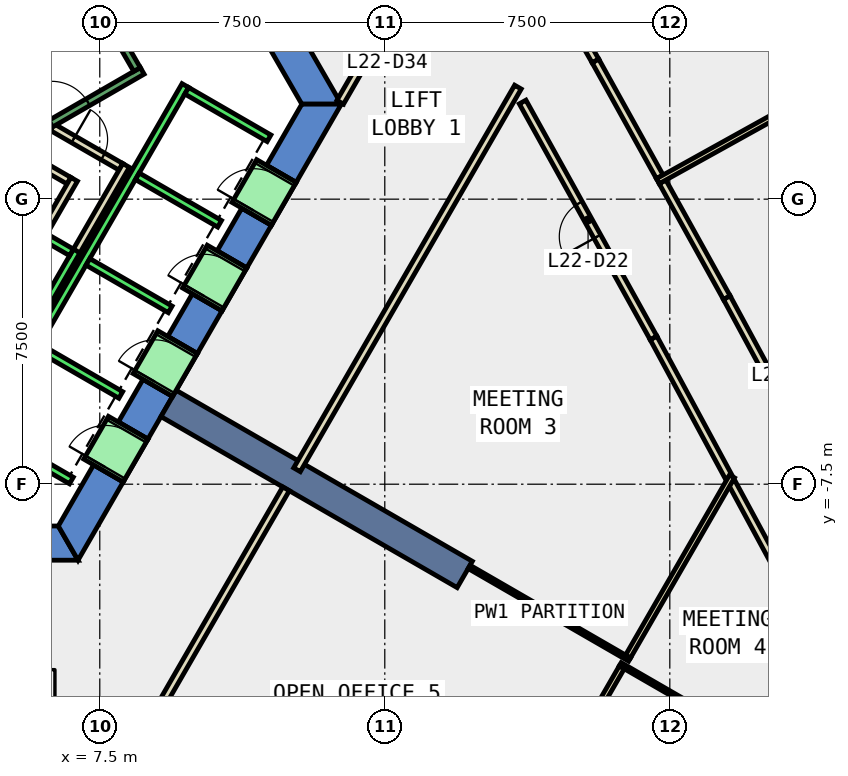
"""IFC4 building model, lengths in metres.
Left out: names, types, materials, properties, quantities, classifications, styles, units other than length and angle.
Written with IfcOpenShell. Run it as: python <this file> out.ifc"""

import sys

from ifc_helpers import new_model, si_unit, direction, frame, frame_2d, origin, place, context, subcontext, project, spatial, polyline, rectangle, outline, extrude, element, fill, save


model = new_model("IFC4")
c1 = context("Model", 3, precision=1e-05, world=origin(), true_north=direction((0.0, 1.0)))
c2 = subcontext(c1, "Body", "Model", "MODEL_VIEW")
j1 = project(units=[si_unit("LENGTHUNIT", "METRE"), si_unit("PLANEANGLEUNIT", "RADIAN")], contexts=[c1])
p1 = place(None, origin())
s1 = spatial("IfcSite", under=j1, at=p1, CompositionType="ELEMENT")
p2 = place(p1, origin())
s2 = spatial("IfcBuilding", under=s1, at=p2, CompositionType="ELEMENT")
p3 = place(p2, frame((0.0, 0.0, 103.4)))
s3 = spatial("IfcBuildingStorey", under=s2, at=p3, CompositionType="ELEMENT", Elevation=103.4)
p4 = place(p3, frame((0.0, 0.0, -0.4)))
e1 = element("IfcWall", 1, at=p4, inside=s3, PredefinedType="SHEAR", context=c2, shape_type="SweptSolid", body=[
    extrude(outline(polyline([(8.517, 11.748), (7.738, 11.298), (12.817, 2.5), (13.856, 2.5), (8.517, 11.748)])), origin(), (0.0, 0.0, 1.0), 4.2),
])
p5 = place(p3, frame((0.0, 0.0, -0.4)))
e2 = element("IfcWall", 2, at=p5, inside=s3, PredefinedType="SHEAR", context=c2, shape_type="SweptSolid", body=[
    extrude(outline(polyline([(5.75, -8.6), (5.75, -9.5), (6.928, -9.5), (6.409, -8.6), (5.75, -8.6)])), origin(), (0.0, 0.0, 1.0), 4.2),
])
p6 = place(p3, frame((0.0, 0.0, -0.4)))
e3 = element("IfcWall", 3, at=p6, inside=s3, PredefinedType="SHEAR", context=c2, shape_type="SweptSolid", body=[
    extrude(outline(polyline([(8.117, -7.44), (7.338, -6.99), (6.409, -8.6), (6.928, -9.5), (8.117, -7.44)])), origin(), (0.0, 0.0, 1.0), 4.2),
])
p7 = place(p3, frame((0.0, 0.0, -0.4)))
e4 = element("IfcWall", 4, at=p7, inside=s3, PredefinedType="SHEAR", context=c2, shape_type="SweptSolid", body=[
    extrude(outline(polyline([(9.417, -5.189), (8.638, -4.739), (7.988, -5.864), (8.767, -6.314), (9.417, -5.189)])), origin(), (0.0, 0.0, 1.0), 4.2),
])
p8 = place(p3, frame((0.0, 0.0, -0.4)))
e5 = element("IfcWall", 5, at=p8, inside=s3, PredefinedType="SHEAR", context=c2, shape_type="SweptSolid", body=[
    extrude(outline(polyline([(10.717, -2.937), (9.938, -2.487), (9.288, -3.613), (10.067, -4.063), (10.717, -2.937)])), origin(), (0.0, 0.0, 1.0), 4.2),
])
p9 = place(p3, frame((0.0, 0.0, -0.4)))
e6 = element("IfcWall", 6, at=p9, inside=s3, PredefinedType="SHEAR", context=c2, shape_type="SweptSolid", body=[
    extrude(outline(polyline([(12.017, -0.686), (11.238, -0.236), (10.588, -1.361), (11.367, -1.811), (12.017, -0.686)])), origin(), (0.0, 0.0, 1.0), 4.2),
])
p10 = place(p3, frame((0.0, 0.0, -0.4)))
e7 = element("IfcWall", 7, at=p10, inside=s3, PredefinedType="SHEAR", context=c2, shape_type="SweptSolid", body=[
    extrude(outline(polyline([(11.888, 0.89), (12.667, 0.44), (13.856, 2.5), (12.817, 2.5), (11.888, 0.89)])), origin(), (0.0, 0.0, 1.0), 4.2),
])
p11 = place(p3, frame((0.0, 0.0, 3.6)))
e8 = element("IfcWall", 8, at=p11, inside=s3, PredefinedType="SHEAR", context=c2, shape_type="SweptSolid", body=[
    extrude(outline(polyline([(8.767, -6.314), (7.988, -5.864), (7.338, -6.99), (8.117, -7.44), (8.767, -6.314)])), origin(), (0.0, 0.0, 1.0), 0.2),
])
p12 = place(p3, frame((0.0, 0.0, 3.6)))
e9 = element("IfcWall", 9, at=p12, inside=s3, PredefinedType="SHEAR", context=c2, shape_type="SweptSolid", body=[
    extrude(outline(polyline([(10.067, -4.063), (9.288, -3.613), (8.638, -4.739), (9.417, -5.189), (10.067, -4.063)])), origin(), (0.0, 0.0, 1.0), 0.2),
])
p13 = place(p3, frame((0.0, 0.0, 3.6)))
e10 = element("IfcWall", 10, at=p13, inside=s3, PredefinedType="SHEAR", context=c2, shape_type="SweptSolid", body=[
    extrude(outline(polyline([(11.367, -1.811), (10.588, -1.361), (9.938, -2.487), (10.717, -2.937), (11.367, -1.811)])), origin(), (0.0, 0.0, 1.0), 0.2),
])
p14 = place(p3, frame((0.0, 0.0, 3.6)))
e11 = element("IfcWall", 11, at=p14, inside=s3, PredefinedType="SHEAR", context=c2, shape_type="SweptSolid", body=[
    extrude(outline(polyline([(12.667, 0.44), (11.888, 0.89), (11.238, -0.236), (12.017, -0.686), (12.667, 0.44)])), origin(), (0.0, 0.0, 1.0), 0.2),
])
p15 = place(p3, frame((9.31, -5.375, -0.4), z_axis=(0.0, 0.0, 1.0), x_axis=(0.866017533419, -0.500013631625, 0.0)))
e12 = element("IfcWall", 12, at=p15, inside=s3, PredefinedType="SHEAR", context=c2, shape_type="SweptSolid", body=[
    extrude(rectangle(XDim=9.0, YDim=0.8, at=frame_2d((4.5, 0.0))), origin(), (0.0, 0.0, 1.0), 4.2),
])
p16 = place(p3, frame((24.051, -7.315, 0.0), z_axis=(0.0, 0.0, 1.0), x_axis=(-0.475308630647, 0.87981913234, 0.0)))
e13 = element("IfcWall", 13, at=p16, inside=s3, PredefinedType="PARTITIONING", context=c2, shape_type="SweptSolid", body=[
    extrude(rectangle(XDim=4.166, YDim=0.2, at=frame_2d((2.083, 0.0))), origin(), (0.0, 0.0, 1.0), 3.8),
])
p17 = place(p3, frame((22.071, -3.65, 0.0), z_axis=(0.0, 0.0, 1.0), x_axis=(-0.485198988697, 0.874403763354, 0.0)))
e14 = element("IfcWall", 14, at=p17, inside=s3, PredefinedType="PARTITIONING", context=c2, shape_type="SweptSolid", body=[
    extrude(rectangle(XDim=7.098, YDim=0.2, at=frame_2d((3.549, 0.0))), origin(), (0.0, 0.0, 1.0), 3.8),
])
p18 = place(p17, frame((3.049, 0.0, 0.0)))
e15 = element("IfcOpeningElement", 15, at=p18, cuts=e14, PredefinedType="OPENING", context=c2, shape_type="SweptSolid", body=[
    extrude(rectangle(XDim=1.0, YDim=2.1, at=frame_2d((0.5, 1.05))), frame((0.0, 0.11, 0.0), z_axis=(0.0, -1.0, 0.0), x_axis=(1.0, 0.0, 0.0)), (0.0, 0.0, 1.0), 0.22),
])
p19 = place(p3, frame((25.446, -9.896, 0.0), z_axis=(0.0, 0.0, 1.0), x_axis=(-0.475427182652, 0.879755076141, 0.0)))
e16 = element("IfcWall", 16, at=p19, inside=s3, PredefinedType="PARTITIONING", context=c2, shape_type="SweptSolid", body=[
    extrude(rectangle(XDim=2.785, YDim=0.2, at=frame_2d((1.393, 0.0))), origin(), (0.0, 0.0, 1.0), 3.8),
])
p20 = place(p3, frame((22.309, 0.456, 0.0), z_axis=(0.0, 0.0, 1.0), x_axis=(0.484982854201, -0.87452365956, 0.0)))
e17 = element("IfcWall", 17, at=p20, inside=s3, PredefinedType="PARTITIONING", context=c2, shape_type="SweptSolid", body=[
    extrude(rectangle(XDim=3.487, YDim=0.2, at=frame_2d((1.743, 0.0))), origin(), (0.0, 0.0, 1.0), 3.8),
])
p21 = place(p3, frame((24.0, -2.593, 0.0), z_axis=(0.0, 0.0, 1.0), x_axis=(0.475480817472, -0.879726089312, 0.0)))
e18 = element("IfcWall", 18, at=p21, inside=s3, PredefinedType="PARTITIONING", context=c2, shape_type="SweptSolid", body=[
    extrude(rectangle(XDim=7.05, YDim=0.2, at=frame_2d((3.525, 0.0))), origin(), (0.0, 0.0, 1.0), 3.8),
])
p22 = place(p21, frame((3.1, 0.0, 0.0)))
e19 = element("IfcOpeningElement", 19, at=p22, cuts=e18, PredefinedType="OPENING", context=c2, shape_type="SweptSolid", body=[
    extrude(rectangle(XDim=1.0, YDim=2.1, at=frame_2d((0.5, 1.05))), frame((0.0, 0.11, 0.0), z_axis=(0.0, -1.0, 0.0), x_axis=(1.0, 0.0, 0.0)), (0.0, 0.0, 1.0), 0.22),
])
p23 = place(p3, frame((16.98, 9.89, 0.0), z_axis=(0.0, 0.0, 1.0), x_axis=(0.495123170501, -0.868822793228, 0.0)))
e20 = element("IfcWall", 20, at=p23, inside=s3, PredefinedType="PARTITIONING", context=c2, shape_type="SweptSolid", body=[
    extrude(rectangle(XDim=7.198, YDim=0.2, at=frame_2d((3.599, 0.0))), origin(), (0.0, 0.0, 1.0), 3.8),
])
p24 = place(p23, frame((3.099, 0.0, 0.0)))
e21 = element("IfcOpeningElement", 21, at=p24, cuts=e20, PredefinedType="OPENING", context=c2, shape_type="SweptSolid", body=[
    extrude(rectangle(XDim=1.0, YDim=2.1, at=frame_2d((0.5, 1.05))), frame((0.0, 0.11, 0.0), z_axis=(0.0, -1.0, 0.0), x_axis=(1.0, 0.0, 0.0)), (0.0, 0.0, 1.0), 0.22),
])
p25 = place(p3, frame((20.544, 3.636, 0.0), z_axis=(0.0, 0.0, 1.0), x_axis=(0.485250552989, -0.874375148792, 0.0)))
e22 = element("IfcWall", 22, at=p25, inside=s3, PredefinedType="PARTITIONING", context=c2, shape_type="SweptSolid", body=[
    extrude(rectangle(XDim=3.487, YDim=0.2, at=frame_2d((1.744, 0.0))), origin(), (0.0, 0.0, 1.0), 3.8),
])
p26 = place(p3, frame((5.499, 1.172, 0.0), z_axis=(0.0, 0.0, 1.0), x_axis=(0.866333505267, -0.499465972466, 0.0)))
e23 = element("IfcWall", 23, at=p26, inside=s3, PredefinedType="PARTITIONING", context=c2, shape_type="SweptSolid", body=[
    extrude(rectangle(XDim=1.374, YDim=0.2, at=frame_2d((0.687, 0.0))), origin(), (0.0, 0.0, 1.0), 3.8),
])
p27 = place(p3, frame((6.826, 0.522, 0.0), z_axis=(0.0, 0.0, 1.0), x_axis=(-0.500016722714, -0.866015748706, 0.0)))
e24 = element("IfcWall", 24, at=p27, inside=s3, PredefinedType="PARTITIONING", context=c2, shape_type="SweptSolid", body=[
    extrude(rectangle(XDim=1.7, YDim=0.2, at=frame_2d((0.85, 0.0))), origin(), (0.0, 0.0, 1.0), 3.8),
])
p28 = place(p3, frame((6.25, 1.894, 0.0), z_axis=(0.0, 0.0, 1.0), x_axis=(0.866043184279, -0.499969202016, 0.0)))
e25 = element("IfcWall", 25, at=p28, inside=s3, PredefinedType="PARTITIONING", context=c2, shape_type="SweptSolid", body=[
    extrude(rectangle(XDim=2.084, YDim=0.2, at=frame_2d((1.042, 0.0))), origin(), (0.0, 0.0, 1.0), 3.8),
])
p29 = place(p28, frame((0.642, 0.0, 0.0)))
e26 = element("IfcOpeningElement", 26, at=p29, cuts=e25, PredefinedType="OPENING", context=c2, shape_type="SweptSolid", body=[
    extrude(rectangle(XDim=0.9, YDim=2.1, at=frame_2d((0.45, 1.05))), frame((0.0, 0.11, 0.0), z_axis=(0.0, -1.0, 0.0), x_axis=(1.0, 0.0, 0.0)), (0.0, 0.0, 1.0), 0.22),
])
p30 = place(p3, frame((8.192, 0.888, 0.0), z_axis=(0.0, 0.0, 1.0), x_axis=(-0.499940625693, -0.866059680843, 0.0)))
e27 = element("IfcWall", 27, at=p30, inside=s3, PredefinedType="PARTITIONING", context=c2, shape_type="SweptSolid", body=[
    extrude(rectangle(XDim=2.68, YDim=0.2, at=frame_2d((1.34, 0.0))), origin(), (0.0, 0.0, 1.0), 3.8),
])
p31 = place(p3, frame((13.827, 2.55, 0.0), z_axis=(0.0, 0.0, 1.0), x_axis=(0.500070719615, 0.865984569946, 0.0)))
e28 = element("IfcWall", 28, at=p31, inside=s3, PredefinedType="PARTITIONING", context=c2, shape_type="SweptSolid", body=[
    extrude(rectangle(XDim=4.935, YDim=0.2, at=frame_2d((2.468, 0.0))), origin(), (0.0, 0.0, 1.0), 3.8),
])
p32 = place(p31, frame((1.968, 0.0, 0.0)))
e29 = element("IfcOpeningElement", 29, at=p32, cuts=e28, PredefinedType="OPENING", context=c2, shape_type="SweptSolid", body=[
    extrude(rectangle(XDim=1.0, YDim=2.1, at=frame_2d((0.5, 1.05))), frame((0.0, 0.11, 0.0), z_axis=(0.0, -1.0, 0.0), x_axis=(1.0, 0.0, 0.0)), (0.0, 0.0, 1.0), 0.22),
])
p33 = place(p31, frame((3.068, 0.0, 0.0)))
e30 = element("IfcOpeningElement", 30, at=p33, cuts=e28, PredefinedType="OPENING", context=c2, shape_type="SweptSolid", body=[
    extrude(rectangle(XDim=1.0, YDim=2.1, at=frame_2d((0.5, 1.05))), frame((0.0, 0.11, 0.0), z_axis=(0.0, -1.0, 0.0), x_axis=(1.0, 0.0, 0.0)), (0.0, 0.0, 1.0), 0.22),
])
p34 = place(p3, frame((12.401, -7.621, 0.0), z_axis=(0.0, 0.0, 1.0), x_axis=(-0.499983724212, -0.866034800411, 0.0)))
e31 = element("IfcWall", 31, at=p34, inside=s3, PredefinedType="PARTITIONING", context=c2, shape_type="SweptSolid", body=[
    extrude(rectangle(XDim=9.302, YDim=0.2, at=frame_2d((4.651, 0.0))), origin(), (0.0, 0.0, 1.0), 3.8),
])
p35 = place(p3, frame((18.503, 2.949, 0.0), z_axis=(0.0, 0.0, 1.0), x_axis=(-0.49997390151, -0.86604047123, 0.0)))
e32 = element("IfcWall", 32, at=p35, inside=s3, PredefinedType="PARTITIONING", context=c2, shape_type="SweptSolid", body=[
    extrude(rectangle(XDim=11.626, YDim=0.2, at=frame_2d((5.813, 0.0))), origin(), (0.0, 0.0, 1.0), 3.8),
])
p36 = place(p3, frame((17.219, -9.676, 0.0), z_axis=(0.0, 0.0, 1.0), x_axis=(0.86598459596, -0.500070674565, 0.0)))
e33 = element("IfcWall", 33, at=p36, inside=s3, PredefinedType="PARTITIONING", context=c2, shape_type="SweptSolid", body=[
    extrude(rectangle(XDim=4.875, YDim=0.1, at=frame_2d((2.438, 0.0))), origin(), (0.0, 0.0, 1.0), 3.8),
])
p37 = place(p3, frame((21.236, -12.319, 0.0), z_axis=(0.0, 0.0, 1.0), x_axis=(-0.500016488359, -0.866015884017, 0.0)))
e34 = element("IfcWall", 34, at=p37, inside=s3, PredefinedType="PARTITIONING", context=c2, shape_type="SweptSolid", body=[
    extrude(rectangle(XDim=5.702, YDim=0.15, at=frame_2d((2.851, 0.0))), origin(), (0.0, 0.0, 1.0), 3.8),
])
p38 = place(p3, frame((24.137, -7.294, 0.0), z_axis=(0.0, 0.0, 1.0), x_axis=(-0.500001804394, -0.866024362014, 0.0)))
e35 = element("IfcWall", 35, at=p38, inside=s3, PredefinedType="PARTITIONING", context=c2, shape_type="SweptSolid", body=[
    extrude(rectangle(XDim=5.472, YDim=0.15, at=frame_2d((2.736, 0.0))), origin(), (0.0, 0.0, 1.0), 3.8),
])
p39 = place(p3, frame((21.196, -12.238, 0.0), z_axis=(0.0, 0.0, 1.0), x_axis=(0.866023145199, -0.500003911965, 0.0)))
e36 = element("IfcWall", 36, at=p39, inside=s3, PredefinedType="PARTITIONING", context=c2, shape_type="SweptSolid", body=[
    extrude(rectangle(XDim=8.71, YDim=0.1, at=frame_2d((4.355, 0.0))), origin(), (0.0, 0.0, 1.0), 3.8),
])
p40 = place(p3, frame((22.185, 0.473, 0.0), z_axis=(0.0, 0.0, 1.0), x_axis=(0.874372498137, 0.485255329184, 0.0)))
e37 = element("IfcWall", 37, at=p40, inside=s3, PredefinedType="PARTITIONING", context=c2, shape_type="SweptSolid", body=[
    extrude(rectangle(XDim=6.9, YDim=0.15, at=frame_2d((3.45, 0.0))), origin(), (0.0, 0.0, 1.0), 3.8),
])
p41 = place(p3, frame((5.492, -3.788, 0.0), z_axis=(0.0, 0.0, 1.0), x_axis=(0.500011755427, 0.866018616679, 0.0)))
e38 = element("IfcWall", 38, at=p41, inside=s3, PredefinedType="STANDARD", context=c2, shape_type="SweptSolid", body=[
    extrude(rectangle(XDim=2.8, YDim=0.2, at=frame_2d((1.4, 0.0))), origin(), (0.0, 0.0, 1.0), 3.8),
])
p42 = place(p3, frame((4.677, -0.2, 0.0), z_axis=(0.0, 0.0, 1.0), x_axis=(0.865973769406, -0.500089422704, 0.0)))
e39 = element("IfcWall", 39, at=p42, inside=s3, PredefinedType="STANDARD", context=c2, shape_type="SweptSolid", body=[
    extrude(rectangle(XDim=2.399, YDim=0.2, at=frame_2d((1.2, 0.0))), origin(), (0.0, 0.0, 1.0), 3.8),
])
p43 = place(p3, frame((4.451, -6.19, 0.0), z_axis=(0.0, 0.0, 1.0), x_axis=(0.50000090737, 0.866024879913, 0.0)))
e40 = element("IfcWall", 40, at=p43, inside=s3, PredefinedType="STANDARD", context=c2, shape_type="SweptSolid", body=[
    extrude(rectangle(XDim=10.6, YDim=0.2, at=frame_2d((5.3, 0.0))), origin(), (0.0, 0.0, 1.0), 3.8),
])
for number, where, z_axis, x_axis in (
    (41, (4.588, -6.153, 0.0), (0.0, 0.0, 1.0), (0.866, -0.5, 0.0)),
    (42, (5.888, -3.902, 0.0), (0.0, 0.0, 1.0), (0.866, -0.5, 0.0)),
    (43, (7.188, -1.65, 0.0), (0.0, 0.0, 1.0), (0.866, -0.5, 0.0)),
    (44, (8.488, 0.602, 0.0), (0.0, 0.0, 1.0), (0.866, -0.5, 0.0)),
):
    element("IfcWall", number, at=place(p3, frame(where, z_axis=z_axis, x_axis=x_axis)), inside=s3, PredefinedType="STANDARD", context=c2, shape_type="SweptSolid", body=[
        extrude(rectangle(XDim=2.5, YDim=0.2, at=frame_2d((1.25, 0.0))), origin(), (0.0, 0.0, 1.0), 3.8),
    ])
p44 = place(p3, frame((9.788, 2.853, 0.0), z_axis=(0.0, 0.0, 1.0), x_axis=(0.865998541277, -0.500046524342, 0.0)))
e45 = element("IfcWall", 45, at=p44, inside=s3, PredefinedType="STANDARD", context=c2, shape_type="SweptSolid", body=[
    extrude(rectangle(XDim=2.5, YDim=0.2, at=frame_2d((1.25, 0.0))), origin(), (0.0, 0.0, 1.0), 3.8),
])
p45 = place(p3, frame((7.598, -7.14, 0.0), z_axis=(0.0, 0.0, 1.0), x_axis=(0.500362116554, 0.865816234728, 0.0)))
e46 = element("IfcWall", 46, at=p45, inside=s3, PredefinedType="STANDARD", context=c2, shape_type="SweptSolid", body=[
    extrude(rectangle(XDim=1.299, YDim=1.2, at=frame_2d((0.65, 0.0))), origin(), (0.0, 0.0, 1.0), 2.4),
])
p46 = place(p45, frame((0.1, 0.0, 0.0)))
e47 = element("IfcOpeningElement", 47, at=p46, cuts=e46, PredefinedType="OPENING", context=c2, shape_type="SweptSolid", body=[
    extrude(rectangle(XDim=1.1, YDim=2.3, at=frame_2d((0.55, 1.15))), frame((0.0, 0.61, 0.0), z_axis=(0.0, -1.0, 0.0), x_axis=(1.0, 0.0, 0.0)), (0.0, 0.0, 1.0), 1.22),
])
p47 = place(p3, frame((8.898, -4.889, 0.0), z_axis=(0.0, 0.0, 1.0), x_axis=(0.500036693733, 0.866004217611, 0.0)))
e48 = element("IfcWall", 48, at=p47, inside=s3, PredefinedType="STANDARD", context=c2, shape_type="SweptSolid", body=[
    extrude(rectangle(XDim=1.3, YDim=1.2, at=frame_2d((0.65, 0.0))), origin(), (0.0, 0.0, 1.0), 2.4),
])
p48 = place(p47, frame((0.1, 0.0, 0.0)))
e49 = element("IfcOpeningElement", 49, at=p48, cuts=e48, PredefinedType="OPENING", context=c2, shape_type="SweptSolid", body=[
    extrude(rectangle(XDim=1.1, YDim=2.3, at=frame_2d((0.55, 1.15))), frame((0.0, 0.61, 0.0), z_axis=(0.0, -1.0, 0.0), x_axis=(1.0, 0.0, 0.0)), (0.0, 0.0, 1.0), 1.22),
])
p49 = place(p3, frame((10.198, -2.637, 0.0), z_axis=(0.0, 0.0, 1.0), x_axis=(0.49989585183, 0.866085525409, 0.0)))
e50 = element("IfcWall", 50, at=p49, inside=s3, PredefinedType="STANDARD", context=c2, shape_type="SweptSolid", body=[
    extrude(rectangle(XDim=1.3, YDim=1.2, at=frame_2d((0.65, 0.0))), origin(), (0.0, 0.0, 1.0), 2.4),
])
p50 = place(p49, frame((0.1, 0.0, 0.0)))
e51 = element("IfcOpeningElement", 51, at=p50, cuts=e50, PredefinedType="OPENING", context=c2, shape_type="SweptSolid", body=[
    extrude(rectangle(XDim=1.1, YDim=2.3, at=frame_2d((0.55, 1.15))), frame((0.0, 0.61, 0.0), z_axis=(0.0, -1.0, 0.0), x_axis=(1.0, 0.0, 0.0)), (0.0, 0.0, 1.0), 1.22),
])
p51 = place(p3, frame((11.498, -0.385, 0.0), z_axis=(0.0, 0.0, 1.0), x_axis=(0.500221244143, 0.865897630733, 0.0)))
e52 = element("IfcWall", 52, at=p51, inside=s3, PredefinedType="STANDARD", context=c2, shape_type="SweptSolid", body=[
    extrude(rectangle(XDim=1.299, YDim=1.2, at=frame_2d((0.65, 0.0))), origin(), (0.0, 0.0, 1.0), 2.4),
])
p52 = place(p51, frame((0.1, 0.0, 0.0)))
e53 = element("IfcOpeningElement", 53, at=p52, cuts=e52, PredefinedType="OPENING", context=c2, shape_type="SweptSolid", body=[
    extrude(rectangle(XDim=1.1, YDim=2.3, at=frame_2d((0.55, 1.15))), frame((0.0, 0.61, 0.0), z_axis=(0.0, -1.0, 0.0), x_axis=(1.0, 0.0, 0.0)), (0.0, 0.0, 1.0), 1.22),
])
p53 = place(p3, frame((4.806, 1.176, 0.0), z_axis=(0.0, 0.0, 1.0), x_axis=(0.866059941101, 0.499940174841, 0.0)))
e54 = element("IfcWall", 54, at=p53, inside=s3, PredefinedType="STANDARD", context=c2, shape_type="SweptSolid", body=[
    extrude(rectangle(XDim=4.4, YDim=0.2, at=frame_2d((2.2, 0.0))), origin(), (0.0, 0.0, 1.0), 3.8),
])
p54 = place(p53, frame((1.65, 0.0, 0.0)))
e55 = element("IfcOpeningElement", 55, at=p54, cuts=e54, PredefinedType="OPENING", context=c2, shape_type="SweptSolid", body=[
    extrude(rectangle(XDim=1.1, YDim=2.2, at=frame_2d((0.55, 1.1))), frame((0.0, 0.11, 0.0), z_axis=(0.0, -1.0, 0.0), x_axis=(1.0, 0.0, 0.0)), (0.0, 0.0, 1.0), 0.22),
])
p55 = place(p3, frame((8.48, 3.412, 0.0), z_axis=(0.0, 0.0, 1.0), x_axis=(-0.499978703459, 0.866037698999, 0.0)))
e56 = element("IfcWall", 56, at=p55, inside=s3, PredefinedType="STANDARD", context=c2, shape_type="SweptSolid", body=[
    extrude(rectangle(XDim=6.9, YDim=0.2, at=frame_2d((3.45, 0.0))), origin(), (0.0, 0.0, 1.0), 3.8),
])
p56 = place(p18, origin())
e57 = element("IfcDoor", 57, at=p56, inside=s3, OperationType="SINGLE_SWING_RIGHT", PredefinedType="DOOR", context=c2, shape_type="SweptSolid", body=[
    extrude(rectangle(XDim=1.0, YDim=2.1, at=frame_2d((0.5, 1.05))), frame((0.0, 0.025, 0.0), z_axis=(0.0, -1.0, 0.0), x_axis=(1.0, 0.0, 0.0)), (0.0, 0.0, 1.0), 0.05),
])
fill(e15, e57)
p57 = place(p29, origin())
e58 = element("IfcDoor", 58, at=p57, inside=s3, OperationType="SINGLE_SWING_LEFT", PredefinedType="DOOR", context=c2, shape_type="SweptSolid", body=[
    extrude(rectangle(XDim=0.9, YDim=2.1, at=frame_2d((0.45, 1.05))), frame((0.0, 0.025, 0.0), z_axis=(0.0, -1.0, 0.0), x_axis=(1.0, 0.0, 0.0)), (0.0, 0.0, 1.0), 0.05),
])
fill(e26, e58)
p58 = place(p46, origin())
e59 = element("IfcDoor", 59, at=p58, inside=s3, OperationType="SLIDING_TO_LEFT", PredefinedType="DOOR", context=c2, shape_type="SweptSolid", body=[
    extrude(rectangle(XDim=1.1, YDim=2.3, at=frame_2d((0.55, 1.15))), frame((0.0, 0.025, 0.0), z_axis=(0.0, -1.0, 0.0), x_axis=(1.0, 0.0, 0.0)), (0.0, 0.0, 1.0), 0.05),
])
fill(e47, e59)
p59 = place(p48, origin())
e60 = element("IfcDoor", 60, at=p59, inside=s3, OperationType="SLIDING_TO_LEFT", PredefinedType="DOOR", context=c2, shape_type="SweptSolid", body=[
    extrude(rectangle(XDim=1.1, YDim=2.3, at=frame_2d((0.55, 1.15))), frame((0.0, 0.025, 0.0), z_axis=(0.0, -1.0, 0.0), x_axis=(1.0, 0.0, 0.0)), (0.0, 0.0, 1.0), 0.05),
])
fill(e49, e60)
p60 = place(p50, origin())
e61 = element("IfcDoor", 61, at=p60, inside=s3, OperationType="SLIDING_TO_LEFT", PredefinedType="DOOR", context=c2, shape_type="SweptSolid", body=[
    extrude(rectangle(XDim=1.1, YDim=2.3, at=frame_2d((0.55, 1.15))), frame((0.0, 0.025, 0.0), z_axis=(0.0, -1.0, 0.0), x_axis=(1.0, 0.0, 0.0)), (0.0, 0.0, 1.0), 0.05),
])
fill(e51, e61)
p61 = place(p52, origin())
e62 = element("IfcDoor", 62, at=p61, inside=s3, OperationType="SLIDING_TO_LEFT", PredefinedType="DOOR", context=c2, shape_type="SweptSolid", body=[
    extrude(rectangle(XDim=1.1, YDim=2.3, at=frame_2d((0.55, 1.15))), frame((0.0, 0.025, 0.0), z_axis=(0.0, -1.0, 0.0), x_axis=(1.0, 0.0, 0.0)), (0.0, 0.0, 1.0), 0.05),
])
fill(e53, e62)
p62 = place(p54, origin())
e63 = element("IfcDoor", 63, at=p62, inside=s3, OperationType="SINGLE_SWING_LEFT", PredefinedType="DOOR", context=c2, shape_type="SweptSolid", body=[
    extrude(rectangle(XDim=1.1, YDim=2.2, at=frame_2d((0.55, 1.1))), frame((0.0, 0.025, 0.0), z_axis=(0.0, -1.0, 0.0), x_axis=(1.0, 0.0, 0.0)), (0.0, 0.0, 1.0), 0.05),
])
fill(e55, e63)
save(model, sys.argv[1])
